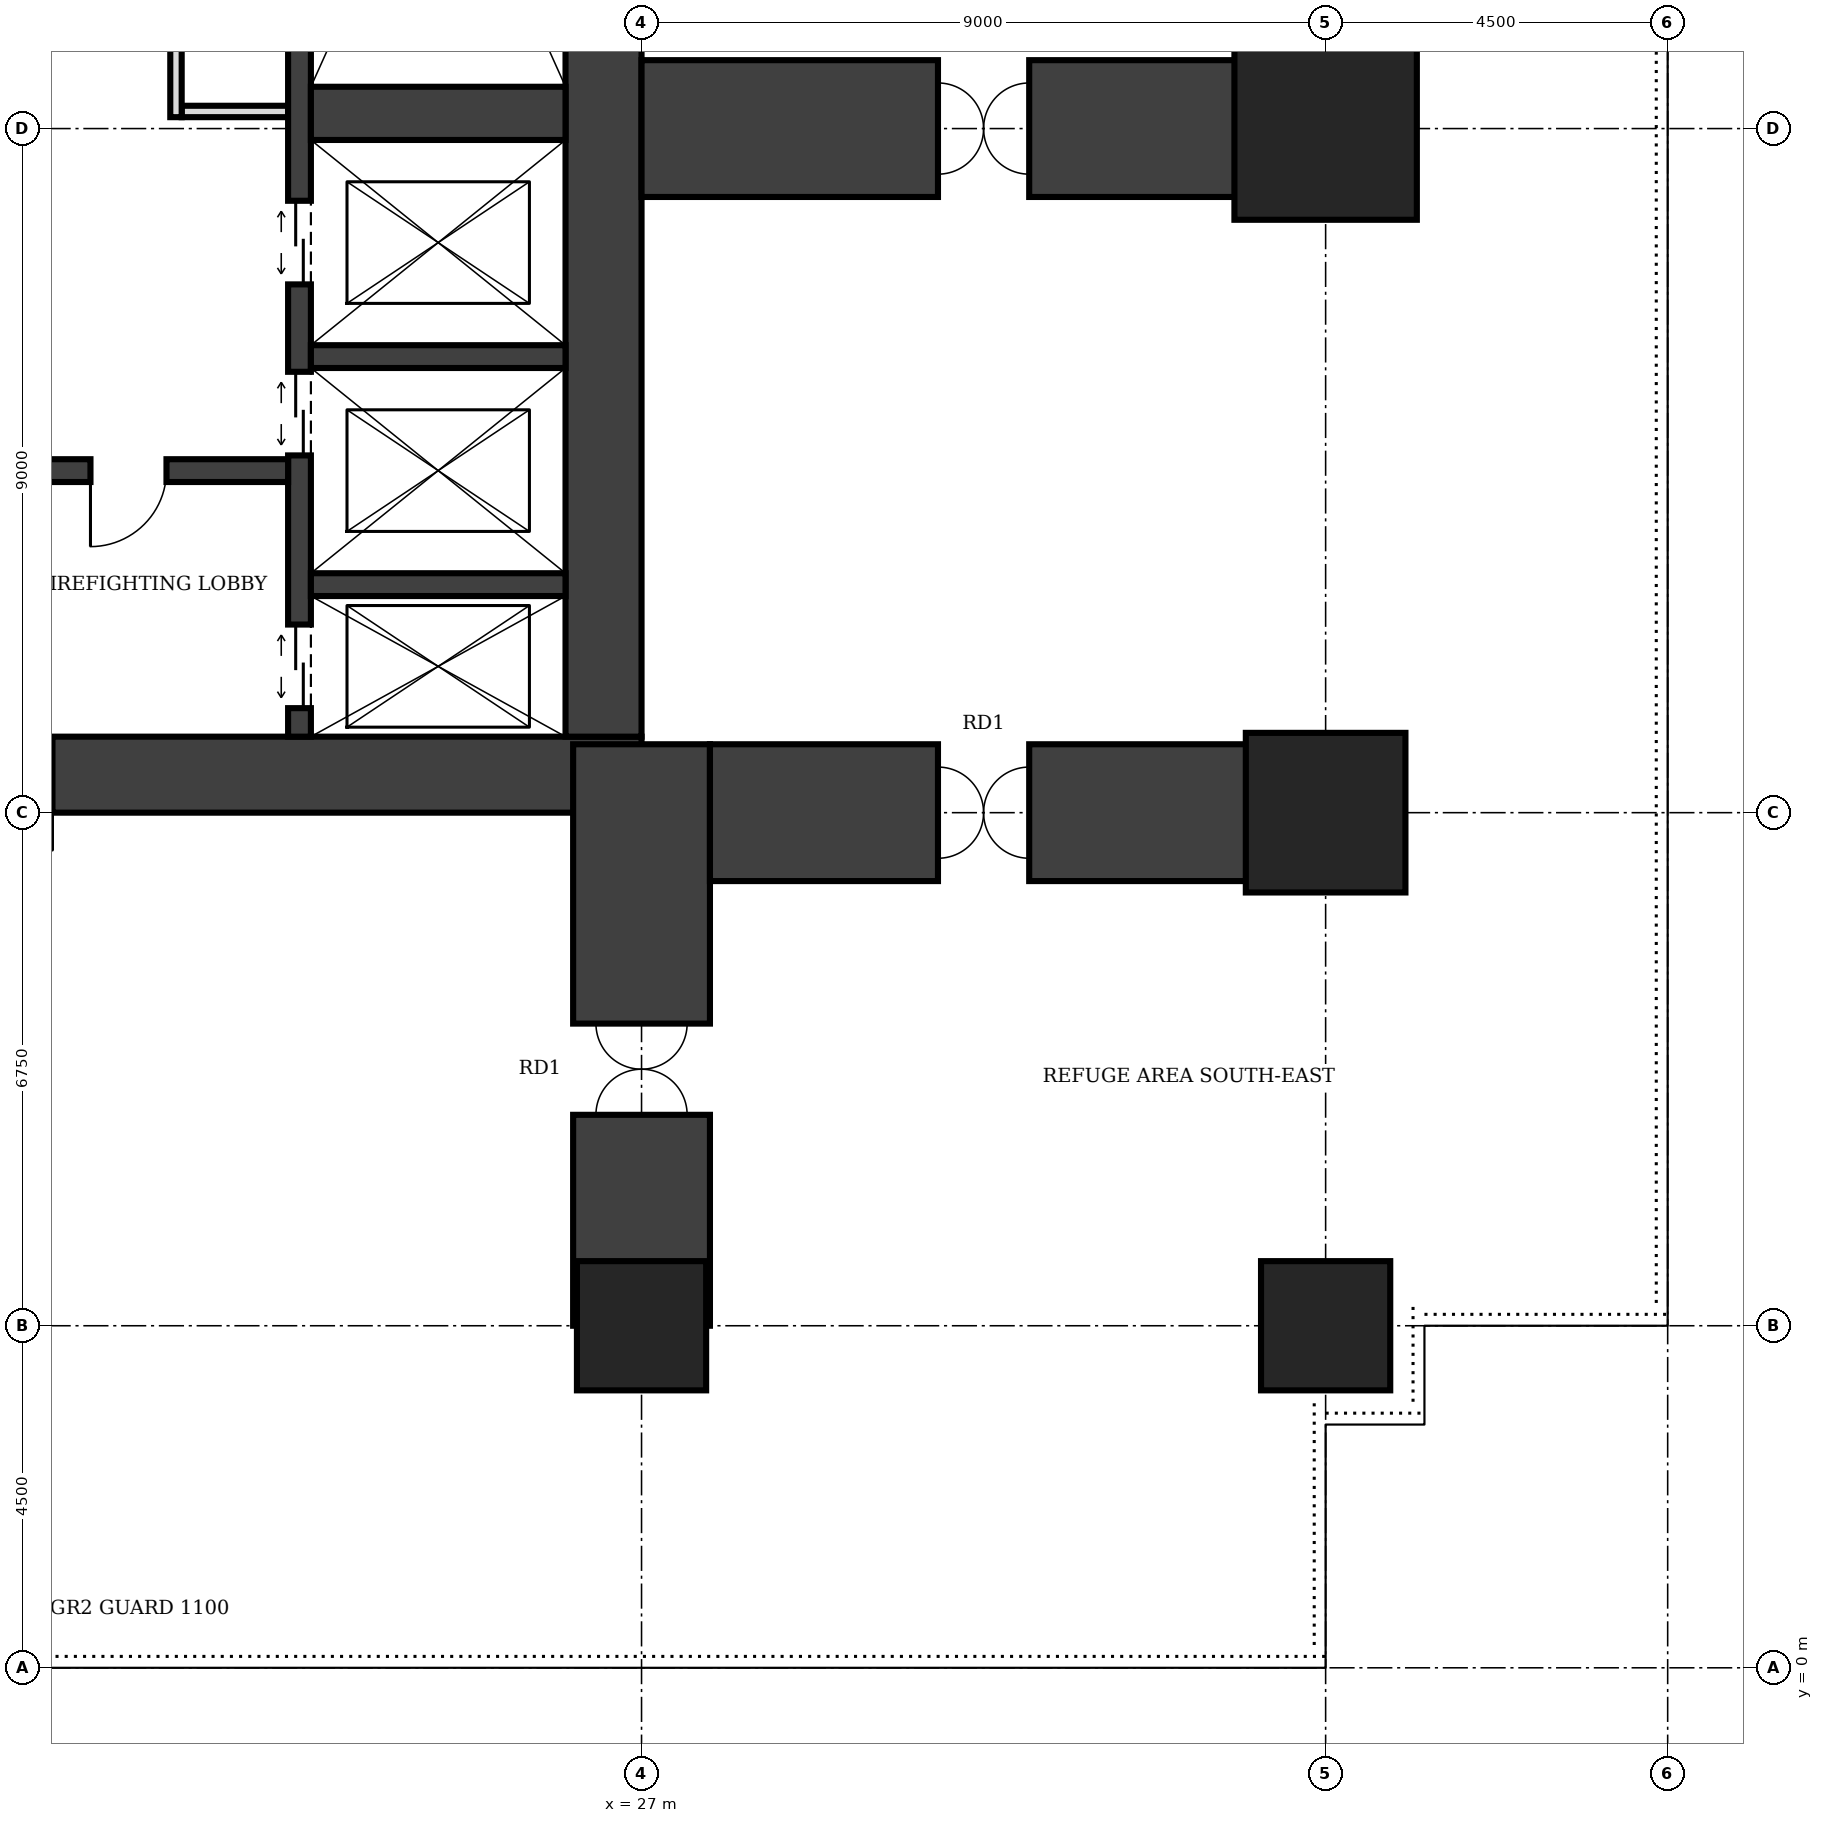
"""IFC4 building model, lengths in metres.
Left out: names, types, materials, properties, quantities, classifications, styles, units other than length and angle.
Written with IfcOpenShell. Run it as: python <this file> out.ifc"""

import sys

from ifc_helpers import new_model, si_unit, direction, frame, frame_2d, origin, origin_2d, place, context, subcontext, project, spatial, rectangle, extrude, element, fill, save


model = new_model("IFC4")
c1 = context("Model", 3, precision=1e-05, world=origin(), true_north=direction((0.0, 1.0)))
c2 = subcontext(c1, "Body", "Model", "MODEL_VIEW")
j1 = project(units=[si_unit("LENGTHUNIT", "METRE"), si_unit("PLANEANGLEUNIT", "RADIAN")], contexts=[c1])
p1 = place(None, origin())
s1 = spatial("IfcSite", under=j1, at=p1, CompositionType="ELEMENT")
p2 = place(p1, origin())
s2 = spatial("IfcBuilding", under=s1, at=p2, CompositionType="ELEMENT")
p3 = place(p2, frame((0.0, 0.0, 169.0)))
s3 = spatial("IfcBuildingStorey", under=s2, at=p3, CompositionType="ELEMENT", Elevation=169.0)
p4 = place(p3, frame((13.5, 11.75, 0.0), z_axis=(0.0, 0.0, 1.0), x_axis=(1.0, 0.0, 0.0)))
e1 = element("IfcWall", 1, at=p4, inside=s3, PredefinedType="SHEAR", context=c2, shape_type="SweptSolid", body=[
    extrude(rectangle(XDim=13.5, YDim=1.0, at=frame_2d((6.75, 0.0))), origin(), (0.0, 0.0, 1.0), 8.0),
])
p5 = place(p4, frame((4.75, 0.0, 0.0)))
e2 = element("IfcOpeningElement", 2, at=p5, cuts=e1, PredefinedType="OPENING", context=c2, shape_type="SweptSolid", body=[
    extrude(rectangle(XDim=1.0, YDim=2.1, at=frame_2d((0.5, 1.05))), frame((0.0, 0.51, 0.0), z_axis=(0.0, -1.0, 0.0), x_axis=(1.0, 0.0, 0.0)), (0.0, 0.0, 1.0), 1.02),
])
p6 = place(p3, frame((26.5, 12.25, 0.0), z_axis=(0.0, 0.0, 1.0), x_axis=(0.0, 1.0, 0.0)))
e3 = element("IfcWall", 3, at=p6, inside=s3, PredefinedType="SHEAR", context=c2, shape_type="SweptSolid", body=[
    extrude(rectangle(XDim=16.0, YDim=1.0, at=frame_2d((8.0, 0.0))), origin(), (0.0, 0.0, 1.0), 8.0),
])
p7 = place(p3, frame((22.5, 12.25, 0.0), z_axis=(0.0, 0.0, 1.0), x_axis=(0.0, 1.0, 0.0)))
e4 = element("IfcWall", 4, at=p7, inside=s3, PredefinedType="SHEAR", context=c2, shape_type="SweptSolid", body=[
    extrude(rectangle(XDim=16.0, YDim=0.3, at=frame_2d((8.0, 0.0))), origin(), (0.0, 0.0, 1.0), 8.0),
])
p8 = place(p7, frame((14.6, 0.0, 0.0)))
e5 = element("IfcOpeningElement", 5, at=p8, cuts=e4, PredefinedType="OPENING", context=c2, shape_type="SweptSolid", body=[
    extrude(rectangle(XDim=1.0, YDim=2.1, at=frame_2d((0.5, 1.05))), frame((0.0, 0.16, 0.0), z_axis=(0.0, -1.0, 0.0), x_axis=(1.0, 0.0, 0.0)), (0.0, 0.0, 1.0), 0.32),
])
p9 = place(p7, frame((0.375, 0.0, 0.0)))
e6 = element("IfcOpeningElement", 6, at=p9, cuts=e4, PredefinedType="OPENING", context=c2, shape_type="SweptSolid", body=[
    extrude(rectangle(XDim=1.1, YDim=2.1, at=frame_2d((0.55, 1.05))), frame((0.0, 0.16, 0.0), z_axis=(0.0, -1.0, 0.0), x_axis=(1.0, 0.0, 0.0)), (0.0, 0.0, 1.0), 0.32),
])
p10 = place(p7, frame((3.7, 0.0, 0.0)))
e7 = element("IfcOpeningElement", 7, at=p10, cuts=e4, PredefinedType="OPENING", context=c2, shape_type="SweptSolid", body=[
    extrude(rectangle(XDim=1.1, YDim=2.1, at=frame_2d((0.55, 1.05))), frame((0.0, 0.16, 0.0), z_axis=(0.0, -1.0, 0.0), x_axis=(1.0, 0.0, 0.0)), (0.0, 0.0, 1.0), 0.32),
])
p11 = place(p7, frame((5.95, 0.0, 0.0)))
e8 = element("IfcOpeningElement", 8, at=p11, cuts=e4, PredefinedType="OPENING", context=c2, shape_type="SweptSolid", body=[
    extrude(rectangle(XDim=1.1, YDim=2.1, at=frame_2d((0.55, 1.05))), frame((0.0, 0.16, 0.0), z_axis=(0.0, -1.0, 0.0), x_axis=(1.0, 0.0, 0.0)), (0.0, 0.0, 1.0), 0.32),
])
p12 = place(p3, frame((18.15, 15.75, 0.0), z_axis=(0.0, 0.0, 1.0), x_axis=(1.0, 0.0, 0.0)))
e9 = element("IfcWall", 9, at=p12, inside=s3, PredefinedType="SHEAR", context=c2, shape_type="SweptSolid", body=[
    extrude(rectangle(XDim=4.2, YDim=0.3, at=frame_2d((2.1, 0.0))), origin(), (0.0, 0.0, 1.0), 8.0),
])
p13 = place(p12, frame((1.6, 0.0, 0.0)))
e10 = element("IfcOpeningElement", 10, at=p13, cuts=e9, PredefinedType="OPENING", context=c2, shape_type="SweptSolid", body=[
    extrude(rectangle(XDim=1.0, YDim=2.1, at=frame_2d((0.5, 1.05))), frame((0.0, 0.16, 0.0), z_axis=(0.0, -1.0, 0.0), x_axis=(1.0, 0.0, 0.0)), (0.0, 0.0, 1.0), 0.32),
])
for number, where, z_axis, x_axis in (
    (11, (22.65, 14.25, 0.0), (0.0, 0.0, 1.0), (1.0, 0.0, 0.0)),
    (12, (22.65, 17.25, 0.0), (0.0, 0.0, 1.0), (1.0, 0.0, 0.0)),
):
    element("IfcWall", number, at=place(p3, frame(where, z_axis=z_axis, x_axis=x_axis)), inside=s3, PredefinedType="SHEAR", context=c2, shape_type="SweptSolid", body=[
        extrude(rectangle(XDim=3.35, YDim=0.3, at=frame_2d((1.675, 0.0))), origin(), (0.0, 0.0, 1.0), 8.0),
    ])
p14 = place(p3, frame((22.65, 20.45, 0.0), z_axis=(0.0, 0.0, 1.0), x_axis=(1.0, 0.0, 0.0)))
e13 = element("IfcWall", 13, at=p14, inside=s3, PredefinedType="SHEAR", context=c2, shape_type="SweptSolid", body=[
    extrude(rectangle(XDim=3.35, YDim=0.7, at=frame_2d((1.675, 0.0))), origin(), (0.0, 0.0, 1.0), 8.0),
])
for number, where, z_axis, x_axis in (
    (14, (27.0, 4.5, 0.0), (0.0, 0.0, 1.0), (1.0, 0.0, 0.0)),
    (15, (36.0, 4.5, 0.0), (0.0, 0.0, 1.0), (1.0, 0.0, 0.0)),
):
    element("IfcColumn", number, at=place(p3, frame(where, z_axis=z_axis, x_axis=x_axis)), inside=s3, PredefinedType="COLUMN", context=c2, shape_type="SweptSolid", body=[
        extrude(rectangle(XDim=1.7, YDim=1.7, at=origin_2d()), origin(), (0.0, 0.0, 1.0), 8.0),
    ])
p15 = place(p3, frame((36.0, 11.25, 0.0), z_axis=(0.0, 0.0, 1.0), x_axis=(1.0, 0.0, 0.0)))
e16 = element("IfcColumn", 16, at=p15, inside=s3, PredefinedType="COLUMN", context=c2, shape_type="SweptSolid", body=[
    extrude(rectangle(XDim=2.1, YDim=2.1, at=origin_2d()), origin(), (0.0, 0.0, 1.0), 8.0),
])
p16 = place(p3, frame((36.0, 20.25, 0.0), z_axis=(0.0, 0.0, 1.0), x_axis=(1.0, 0.0, 0.0)))
e17 = element("IfcColumn", 17, at=p16, inside=s3, PredefinedType="COLUMN", context=c2, shape_type="SweptSolid", body=[
    extrude(rectangle(XDim=2.4, YDim=2.4, at=origin_2d()), origin(), (0.0, 0.0, 1.0), 8.0),
])
p17 = place(p3, frame((27.0, 4.5, 0.0), z_axis=(0.0, 0.0, 1.0), x_axis=(0.0, 1.0, 0.0)))
e18 = element("IfcWall", 18, at=p17, inside=s3, PredefinedType="SHEAR", context=c2, shape_type="SweptSolid", body=[
    extrude(rectangle(XDim=7.65, YDim=1.8, at=frame_2d((3.825, 0.0))), origin(), (0.0, 0.0, 1.0), 8.0),
])
p18 = place(p17, frame((2.775, 0.0, 0.0)))
e19 = element("IfcOpeningElement", 19, at=p18, cuts=e18, PredefinedType="OPENING", context=c2, shape_type="SweptSolid", body=[
    extrude(rectangle(XDim=1.2, YDim=2.1, at=frame_2d((0.6, 1.05))), frame((0.0, 0.91, 0.0), z_axis=(0.0, -1.0, 0.0), x_axis=(1.0, 0.0, 0.0)), (0.0, 0.0, 1.0), 1.82),
])
p19 = place(p3, frame((27.0, 20.25, 0.0), z_axis=(0.0, 0.0, 1.0), x_axis=(1.0, 0.0, 0.0)))
e20 = element("IfcWall", 20, at=p19, inside=s3, PredefinedType="SHEAR", context=c2, shape_type="SweptSolid", body=[
    extrude(rectangle(XDim=9.0, YDim=1.8, at=frame_2d((4.5, 0.0))), origin(), (0.0, 0.0, 1.0), 8.0),
])
p20 = place(p19, frame((3.9, 0.0, 0.0)))
e21 = element("IfcOpeningElement", 21, at=p20, cuts=e20, PredefinedType="OPENING", context=c2, shape_type="SweptSolid", body=[
    extrude(rectangle(XDim=1.2, YDim=2.1, at=frame_2d((0.6, 1.05))), frame((0.0, 0.91, 0.0), z_axis=(0.0, -1.0, 0.0), x_axis=(1.0, 0.0, 0.0)), (0.0, 0.0, 1.0), 1.82),
])
p21 = place(p3, frame((27.9, 11.25, 0.0), z_axis=(0.0, 0.0, 1.0), x_axis=(1.0, 0.0, 0.0)))
e22 = element("IfcWall", 22, at=p21, inside=s3, PredefinedType="SHEAR", context=c2, shape_type="SweptSolid", body=[
    extrude(rectangle(XDim=8.1, YDim=1.8, at=frame_2d((4.05, 0.0))), origin(), (0.0, 0.0, 1.0), 8.0),
])
p22 = place(p21, frame((3.0, 0.0, 0.0)))
e23 = element("IfcOpeningElement", 23, at=p22, cuts=e22, PredefinedType="OPENING", context=c2, shape_type="SweptSolid", body=[
    extrude(rectangle(XDim=1.2, YDim=2.1, at=frame_2d((0.6, 1.05))), frame((0.0, 0.91, 0.0), z_axis=(0.0, -1.0, 0.0), x_axis=(1.0, 0.0, 0.0)), (0.0, 0.0, 1.0), 1.82),
])
p23 = place(p3, frame((20.875, 20.4, 0.0), z_axis=(0.0, 0.0, 1.0), x_axis=(0.0, 1.0, 0.0)))
e24 = element("IfcWall", 24, at=p23, inside=s3, PredefinedType="PARTITIONING", context=c2, shape_type="SweptSolid", body=[
    extrude(rectangle(XDim=6.0, YDim=0.15, at=frame_2d((3.0, 0.0))), origin(), (0.0, 0.0, 1.0), 7.75),
])
p24 = place(p23, frame((2.55, 0.0, 0.0)))
e25 = element("IfcOpeningElement", 25, at=p24, cuts=e24, PredefinedType="OPENING", context=c2, shape_type="SweptSolid", body=[
    extrude(rectangle(XDim=0.9, YDim=2.1, at=frame_2d((0.45, 1.05))), frame((0.0, 0.085, 0.0), z_axis=(0.0, -1.0, 0.0), x_axis=(1.0, 0.0, 0.0)), (0.0, 0.0, 1.0), 0.17),
])
p25 = place(p3, frame((20.95, 20.475, 0.0), z_axis=(0.0, 0.0, 1.0), x_axis=(1.0, 0.0, 0.0)))
e26 = element("IfcWall", 26, at=p25, inside=s3, PredefinedType="PARTITIONING", context=c2, shape_type="SweptSolid", body=[
    extrude(rectangle(XDim=1.4, YDim=0.15, at=frame_2d((0.7, 0.0))), origin(), (0.0, 0.0, 1.0), 7.75),
])
p26 = place(p13, frame((1.0, 0.0, 0.0), z_axis=(0.0, 0.0, 1.0), x_axis=(-1.0, 0.0, 0.0)))
e27 = element("IfcDoor", 27, at=p26, inside=s3, OperationType="SINGLE_SWING_RIGHT", PredefinedType="DOOR", context=c2, shape_type="SweptSolid", body=[
    extrude(rectangle(XDim=1.0, YDim=2.1, at=frame_2d((0.5, 1.05))), frame((0.0, 0.025, 0.0), z_axis=(0.0, -1.0, 0.0), x_axis=(1.0, 0.0, 0.0)), (0.0, 0.0, 1.0), 0.05),
])
fill(e10, e27)
p27 = place(p9, origin())
e28 = element("IfcDoor", 28, at=p27, inside=s3, OperationType="DOUBLE_DOOR_SLIDING", PredefinedType="DOOR", context=c2, shape_type="SweptSolid", body=[
    extrude(rectangle(XDim=1.1, YDim=2.1, at=frame_2d((0.55, 1.05))), frame((0.0, 0.025, 0.0), z_axis=(0.0, -1.0, 0.0), x_axis=(1.0, 0.0, 0.0)), (0.0, 0.0, 1.0), 0.05),
])
fill(e6, e28)
p28 = place(p10, origin())
e29 = element("IfcDoor", 29, at=p28, inside=s3, OperationType="DOUBLE_DOOR_SLIDING", PredefinedType="DOOR", context=c2, shape_type="SweptSolid", body=[
    extrude(rectangle(XDim=1.1, YDim=2.1, at=frame_2d((0.55, 1.05))), frame((0.0, 0.025, 0.0), z_axis=(0.0, -1.0, 0.0), x_axis=(1.0, 0.0, 0.0)), (0.0, 0.0, 1.0), 0.05),
])
fill(e7, e29)
p29 = place(p11, origin())
e30 = element("IfcDoor", 30, at=p29, inside=s3, OperationType="DOUBLE_DOOR_SLIDING", PredefinedType="DOOR", context=c2, shape_type="SweptSolid", body=[
    extrude(rectangle(XDim=1.1, YDim=2.1, at=frame_2d((0.55, 1.05))), frame((0.0, 0.025, 0.0), z_axis=(0.0, -1.0, 0.0), x_axis=(1.0, 0.0, 0.0)), (0.0, 0.0, 1.0), 0.05),
])
fill(e8, e30)
p30 = place(p18, origin())
e31 = element("IfcDoor", 31, at=p30, inside=s3, OperationType="DOUBLE_DOOR_DOUBLE_SWING", PredefinedType="DOOR", context=c2, shape_type="SweptSolid", body=[
    extrude(rectangle(XDim=1.2, YDim=2.1, at=frame_2d((0.6, 1.05))), frame((0.0, 0.025, 0.0), z_axis=(0.0, -1.0, 0.0), x_axis=(1.0, 0.0, 0.0)), (0.0, 0.0, 1.0), 0.05),
])
fill(e19, e31)
p31 = place(p20, origin())
e32 = element("IfcDoor", 32, at=p31, inside=s3, OperationType="DOUBLE_DOOR_DOUBLE_SWING", PredefinedType="DOOR", context=c2, shape_type="SweptSolid", body=[
    extrude(rectangle(XDim=1.2, YDim=2.1, at=frame_2d((0.6, 1.05))), frame((0.0, 0.025, 0.0), z_axis=(0.0, -1.0, 0.0), x_axis=(1.0, 0.0, 0.0)), (0.0, 0.0, 1.0), 0.05),
])
fill(e21, e32)
p32 = place(p22, origin())
e33 = element("IfcDoor", 33, at=p32, inside=s3, OperationType="DOUBLE_DOOR_DOUBLE_SWING", PredefinedType="DOOR", context=c2, shape_type="SweptSolid", body=[
    extrude(rectangle(XDim=1.2, YDim=2.1, at=frame_2d((0.6, 1.05))), frame((0.0, 0.025, 0.0), z_axis=(0.0, -1.0, 0.0), x_axis=(1.0, 0.0, 0.0)), (0.0, 0.0, 1.0), 0.05),
])
fill(e23, e33)
save(model, sys.argv[1])
